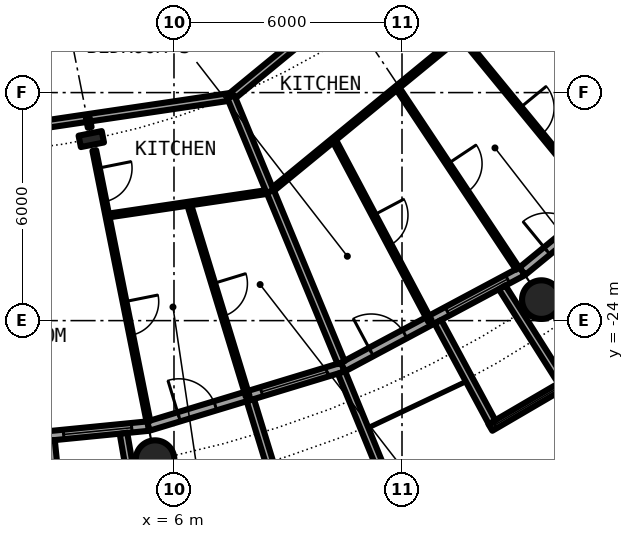
"""IFC4 building model, lengths in metres.
Left out: names, types, materials, properties, quantities, classifications, styles, units other than length and angle.
Written with IfcOpenShell. Run it as: python <this file> out.ifc"""

import sys

from ifc_helpers import new_model, si_unit, direction, frame, frame_2d, origin, origin_2d, place, context, subcontext, project, spatial, rectangle, circle, hollow_circle, i_section, extrude, element, fill, save


model = new_model("IFC4")
c1 = context("Model", 3, precision=1e-05, world=origin(), true_north=direction((0.0, 1.0)))
c2 = subcontext(c1, "Body", "Model", "MODEL_VIEW")
j1 = project(units=[si_unit("LENGTHUNIT", "METRE"), si_unit("PLANEANGLEUNIT", "RADIAN")], contexts=[c1])
p1 = place(None, origin())
s1 = spatial("IfcSite", under=j1, at=p1, CompositionType="ELEMENT")
p2 = place(p1, origin())
s2 = spatial("IfcBuilding", under=s1, at=p2, CompositionType="ELEMENT")
p3 = place(p2, frame((0.0, 0.0, 35.0)))
s3 = spatial("IfcBuildingStorey", under=s2, at=p3, CompositionType="ELEMENT", Elevation=35.0)
for number, where, z_axis, x_axis in (
    (1, (5.501, -27.658, 0.0), (0.0, 0.0, 1.0), (1.0, 0.0, 0.0)),
    (2, (15.667, -23.448, 0.0), (0.0, 0.0, 1.0), (1.0, 0.0, 0.0)),
):
    element("IfcColumn", number, at=place(p3, frame(where, z_axis=z_axis, x_axis=x_axis)), inside=s3, PredefinedType="COLUMN", context=c2, shape_type="SweptSolid", body=[
        extrude(hollow_circle(Radius=0.508, WallThickness=0.05, at=origin_2d()), origin(), (0.0, 0.0, 1.0), 3.05),
    ])
p4 = place(p3, frame((3.824, -19.223, 0.0), z_axis=(0.0, 0.0, 1.0), x_axis=(0.195090322016, -0.980785280403, 0.0)))
e3 = element("IfcColumn", 3, at=p4, inside=s3, PredefinedType="COLUMN", context=c2, shape_type="SweptSolid", body=[
    extrude(i_section(OverallWidth=0.305, OverallDepth=0.62, WebThickness=0.021, FlangeThickness=0.04, FilletRadius=0.027, at=origin_2d()), origin(), (0.0, 0.0, 1.0), 3.05),
])
p5 = place(p3, frame((0.0, -27.3, 0.0), z_axis=(0.0, 0.0, 1.0), x_axis=(0.995173996315, 0.098126026407, 0.0)))
e4 = element("IfcWall", 4, at=p5, inside=s3, PredefinedType="SOLIDWALL", context=c2, shape_type="SweptSolid", body=[
    extrude(rectangle(XDim=5.352, YDim=0.25, at=frame_2d((2.676, 0.0))), origin(), (0.0, 0.0, 1.0), 2.7),
])
p6 = place(p5, frame((0.841, 0.0, 0.0)))
e5 = element("IfcOpeningElement", 5, at=p6, cuts=e4, PredefinedType="OPENING", context=c2, shape_type="SweptSolid", body=[
    extrude(rectangle(XDim=1.0, YDim=2.2, at=frame_2d((0.5, 1.1))), frame((0.0, 0.135, 0.0), z_axis=(0.0, -1.0, 0.0), x_axis=(1.0, 0.0, 0.0)), (0.0, 0.0, 1.0), 0.27),
])
p7 = place(p5, frame((3.111, 0.0, 0.3)))
e6 = element("IfcOpeningElement", 6, at=p7, cuts=e4, PredefinedType="OPENING", context=c2, shape_type="SweptSolid", body=[
    extrude(rectangle(XDim=1.8, YDim=2.1, at=frame_2d((0.9, 1.05))), frame((0.0, 0.135, 0.0), z_axis=(0.0, -1.0, 0.0), x_axis=(1.0, 0.0, 0.0)), (0.0, 0.0, 1.0), 0.27),
])
p8 = place(p3, frame((2.764, -27.153, -0.03), z_axis=(0.0, 0.0, 1.0), x_axis=(0.101505487237, -0.994834979311, 0.0)))
e7 = element("IfcWall", 7, at=p8, inside=s3, PredefinedType="SOLIDWALL", context=c2, shape_type="SweptSolid", body=[
    extrude(rectangle(XDim=3.007, YDim=0.2, at=frame_2d((1.503, 0.0))), origin(), (0.0, 0.0, 1.0), 2.73),
])
p9 = place(p3, frame((4.671, -26.966, -0.03), z_axis=(0.0, 0.0, 1.0), x_axis=(0.170539878907, -0.985350774954, 0.0)))
e8 = element("IfcWall", 8, at=p9, inside=s3, PredefinedType="SOLIDWALL", context=c2, shape_type="SweptSolid", body=[
    extrude(rectangle(XDim=2.932, YDim=0.2, at=frame_2d((1.466, 0.0))), origin(), (0.0, 0.0, 1.0), 2.73),
])
p10 = place(p3, frame((5.326, -26.775, 0.0), z_axis=(0.0, 0.0, 1.0), x_axis=(0.956965678721, 0.290201119486, 0.0)))
e9 = element("IfcWall", 9, at=p10, inside=s3, PredefinedType="SOLIDWALL", context=c2, shape_type="SweptSolid", body=[
    extrude(rectangle(XDim=5.351, YDim=0.25, at=frame_2d((2.676, 0.0))), origin(), (0.0, 0.0, 1.0), 2.7),
])
p11 = place(p10, frame((0.841, 0.0, 0.0)))
e10 = element("IfcOpeningElement", 10, at=p11, cuts=e9, PredefinedType="OPENING", context=c2, shape_type="SweptSolid", body=[
    extrude(rectangle(XDim=1.0, YDim=2.2, at=frame_2d((0.5, 1.1))), frame((0.0, 0.135, 0.0), z_axis=(0.0, -1.0, 0.0), x_axis=(1.0, 0.0, 0.0)), (0.0, 0.0, 1.0), 0.27),
])
p12 = place(p10, frame((3.111, 0.0, 0.3)))
e11 = element("IfcOpeningElement", 11, at=p12, cuts=e9, PredefinedType="OPENING", context=c2, shape_type="SweptSolid", body=[
    extrude(rectangle(XDim=1.8, YDim=2.1, at=frame_2d((0.9, 1.05))), frame((0.0, 0.135, 0.0), z_axis=(0.0, -1.0, 0.0), x_axis=(1.0, 0.0, 0.0)), (0.0, 0.0, 1.0), 0.27),
])
p13 = place(p3, frame((8.009, -26.092, -0.03), z_axis=(0.0, 0.0, 1.0), x_axis=(0.293406695073, -0.955987715029, 0.0)))
e12 = element("IfcWall", 12, at=p13, inside=s3, PredefinedType="SOLIDWALL", context=c2, shape_type="SweptSolid", body=[
    extrude(rectangle(XDim=3.006, YDim=0.2, at=frame_2d((1.503, 0.0))), origin(), (0.0, 0.0, 1.0), 2.73),
])
p14 = place(p3, frame((10.409, -25.364, -0.03), z_axis=(0.0, 0.0, 1.0), x_axis=(0.379509886562, -0.925187681501, 0.0)))
e13 = element("IfcWall", 13, at=p14, inside=s3, PredefinedType="SOLIDWALL", context=c2, shape_type="SweptSolid", body=[
    extrude(rectangle(XDim=2.883, YDim=0.2, at=frame_2d((1.441, 0.0))), origin(), (0.0, 0.0, 1.0), 2.73),
])
p15 = place(p3, frame((10.447, -25.222, 0.0), z_axis=(0.0, 0.0, 1.0), x_axis=(0.881915646801, 0.471407246368, 0.0)))
e14 = element("IfcWall", 14, at=p15, inside=s3, PredefinedType="SOLIDWALL", context=c2, shape_type="SweptSolid", body=[
    extrude(rectangle(XDim=5.352, YDim=0.25, at=frame_2d((2.676, 0.0))), origin(), (0.0, 0.0, 1.0), 2.7),
])
p16 = place(p15, frame((0.841, 0.0, 0.0)))
e15 = element("IfcOpeningElement", 15, at=p16, cuts=e14, PredefinedType="OPENING", context=c2, shape_type="SweptSolid", body=[
    extrude(rectangle(XDim=1.0, YDim=2.2, at=frame_2d((0.5, 1.1))), frame((0.0, 0.135, 0.0), z_axis=(0.0, -1.0, 0.0), x_axis=(1.0, 0.0, 0.0)), (0.0, 0.0, 1.0), 0.27),
])
p17 = place(p15, frame((3.111, 0.0, 0.3)))
e16 = element("IfcOpeningElement", 16, at=p17, cuts=e14, PredefinedType="OPENING", context=c2, shape_type="SweptSolid", body=[
    extrude(rectangle(XDim=1.8, YDim=2.1, at=frame_2d((0.9, 1.05))), frame((0.0, 0.135, 0.0), z_axis=(0.0, -1.0, 0.0), x_axis=(1.0, 0.0, 0.0)), (0.0, 0.0, 1.0), 0.27),
])
p18 = place(p3, frame((14.327, -26.812, -0.03), z_axis=(0.0, 0.0, 1.0), x_axis=(0.863346521872, 0.504611517081, 0.0)))
e17 = element("IfcWall", 17, at=p18, inside=s3, PredefinedType="SOLIDWALL", context=c2, shape_type="SweptSolid", body=[
    extrude(rectangle(XDim=2.336, YDim=0.2, at=frame_2d((1.168, 0.0))), origin(), (0.0, 0.0, 1.0), 2.73),
])
p19 = place(p18, frame((0.128, 0.0, 0.33)))
e18 = element("IfcOpeningElement", 18, at=p19, cuts=e17, PredefinedType="OPENING", context=c2, shape_type="SweptSolid", body=[
    extrude(circle(Radius=1.04, at=frame_2d((1.04, 1.04))), frame((0.0, 0.11, 0.0), z_axis=(0.0, -1.0, 0.0), x_axis=(1.0, 0.0, 0.0)), (0.0, 0.0, 1.0), 0.22),
])
p20 = place(p3, frame((12.945, -24.029, -0.03), z_axis=(0.0, 0.0, 1.0), x_axis=(0.474424310775, -0.88029629861, 0.0)))
e19 = element("IfcWall", 19, at=p20, inside=s3, PredefinedType="SOLIDWALL", context=c2, shape_type="SweptSolid", body=[
    extrude(rectangle(XDim=3.006, YDim=0.2, at=frame_2d((1.503, 0.0))), origin(), (0.0, 0.0, 1.0), 2.73),
])
p21 = place(p3, frame((14.635, -23.126, -0.03), z_axis=(0.0, 0.0, 1.0), x_axis=(0.534437802731, -0.845207805816, 0.0)))
e20 = element("IfcWall", 20, at=p21, inside=s3, PredefinedType="SOLIDWALL", context=c2, shape_type="SweptSolid", body=[
    extrude(rectangle(XDim=2.932, YDim=0.2, at=frame_2d((1.466, 0.0))), origin(), (0.0, 0.0, 1.0), 2.73),
])
p22 = place(p3, frame((15.167, -22.699, 0.0), z_axis=(0.0, 0.0, 1.0), x_axis=(0.773019449054, 0.634382322723, 0.0)))
e21 = element("IfcWall", 21, at=p22, inside=s3, PredefinedType="SOLIDWALL", context=c2, shape_type="SweptSolid", body=[
    extrude(rectangle(XDim=5.352, YDim=0.25, at=frame_2d((2.676, 0.0))), origin(), (0.0, 0.0, 1.0), 2.7),
])
p23 = place(p22, frame((0.841, 0.0, 0.0)))
e22 = element("IfcOpeningElement", 22, at=p23, cuts=e21, PredefinedType="OPENING", context=c2, shape_type="SweptSolid", body=[
    extrude(rectangle(XDim=1.0, YDim=2.2, at=frame_2d((0.5, 1.1))), frame((0.0, 0.135, 0.0), z_axis=(0.0, -1.0, 0.0), x_axis=(1.0, 0.0, 0.0)), (0.0, 0.0, 1.0), 0.27),
])
p24 = place(p22, frame((3.111, 0.0, 0.3)))
e23 = element("IfcOpeningElement", 23, at=p24, cuts=e21, PredefinedType="OPENING", context=c2, shape_type="SweptSolid", body=[
    extrude(rectangle(XDim=1.8, YDim=2.1, at=frame_2d((0.9, 1.05))), frame((0.0, 0.135, 0.0), z_axis=(0.0, -1.0, 0.0), x_axis=(1.0, 0.0, 0.0)), (0.0, 0.0, 1.0), 0.27),
])
p25 = place(p3, frame((4.246, -21.239, 0.0), z_axis=(0.0, 0.0, 1.0), x_axis=(0.989178348771, 0.146718077695, 0.0)))
e24 = element("IfcWall", 24, at=p25, inside=s3, PredefinedType="PARTITIONING", context=c2, shape_type="SweptSolid", body=[
    extrude(rectangle(XDim=4.335, YDim=0.1, at=frame_2d((2.167, 0.0))), origin(), (0.0, 0.0, 1.0), 2.7),
])
p26 = place(p3, frame((8.534, -20.603, 0.0), z_axis=(0.0, 0.0, 1.0), x_axis=(0.773000340237, 0.634405606843, 0.0)))
e25 = element("IfcWall", 25, at=p26, inside=s3, PredefinedType="PARTITIONING", context=c2, shape_type="SweptSolid", body=[
    extrude(rectangle(XDim=6.474, YDim=0.1, at=frame_2d((3.237, 0.0))), origin(), (0.0, 0.0, 1.0), 2.7),
])
p27 = place(p3, frame((-1.927, -19.506, 0.0), z_axis=(0.0, 0.0, 1.0), x_axis=(0.989181308547, 0.146698121399, 0.0)))
e26 = element("IfcWall", 26, at=p27, inside=s3, PredefinedType="PARTITIONING", context=c2, shape_type="SweptSolid", body=[
    extrude(rectangle(XDim=9.531, YDim=0.2, at=frame_2d((4.766, 0.0))), origin(), (0.0, 0.0, 1.0), 2.38),
])
p28 = place(p27, frame((3.316, 0.0, 0.0)))
e27 = element("IfcOpeningElement", 27, at=p28, cuts=e26, PredefinedType="OPENING", context=c2, shape_type="SweptSolid", body=[
    extrude(rectangle(XDim=1.0, YDim=2.3, at=frame_2d((0.5, 1.15))), frame((0.0, 0.11, 0.0), z_axis=(0.0, -1.0, 0.0), x_axis=(1.0, 0.0, 0.0)), (0.0, 0.0, 1.0), 0.22),
])
p29 = place(p3, frame((7.512, -18.105, 0.0), z_axis=(0.0, 0.0, 1.0), x_axis=(0.772704887747, 0.634765434198, 0.0)))
e28 = element("IfcWall", 28, at=p29, inside=s3, PredefinedType="PARTITIONING", context=c2, shape_type="SweptSolid", body=[
    extrude(rectangle(XDim=11.209, YDim=0.2, at=frame_2d((5.604, 0.0))), origin(), (0.0, 0.0, 1.0), 2.38),
])
p30 = place(p29, frame((7.072, 0.0, 0.0)))
e29 = element("IfcOpeningElement", 29, at=p30, cuts=e28, PredefinedType="OPENING", context=c2, shape_type="SweptSolid", body=[
    extrude(rectangle(XDim=1.0, YDim=2.3, at=frame_2d((0.5, 1.15))), frame((0.0, 0.11, 0.0), z_axis=(0.0, -1.0, 0.0), x_axis=(1.0, 0.0, 0.0)), (0.0, 0.0, 1.0), 0.22),
])
p31 = place(p3, frame((3.732, -18.667, 0.0), z_axis=(0.0, 0.0, 1.0), x_axis=(0.197040251839, -0.980395399395, 0.0)))
e30 = element("IfcWall", 30, at=p31, inside=s3, PredefinedType="PARTITIONING", context=c2, shape_type="SweptSolid", body=[
    extrude(rectangle(XDim=0.254, YDim=0.1, at=frame_2d((0.127, 0.0))), origin(), (0.0, 0.0, 1.0), 2.7),
])
p32 = place(p3, frame((3.903, -19.524, 0.0), z_axis=(0.0, 0.0, 1.0), x_axis=(0.195986881771, -0.980606517505, 0.0)))
e31 = element("IfcWall", 31, at=p32, inside=s3, PredefinedType="PARTITIONING", context=c2, shape_type="SweptSolid", body=[
    extrude(rectangle(XDim=7.265, YDim=0.1, at=frame_2d((3.632, 0.0))), origin(), (0.0, 0.0, 1.0), 2.7),
])
p33 = place(p32, frame((0.476, 0.0, 0.0)))
e32 = element("IfcOpeningElement", 32, at=p33, cuts=e31, PredefinedType="OPENING", context=c2, shape_type="SweptSolid", body=[
    extrude(rectangle(XDim=0.9, YDim=2.3, at=frame_2d((0.45, 1.15))), frame((0.0, 0.06, 0.0), z_axis=(0.0, -1.0, 0.0), x_axis=(1.0, 0.0, 0.0)), (0.0, 0.0, 1.0), 0.12),
])
p34 = place(p32, frame((4.057, 0.0, 0.0)))
e33 = element("IfcOpeningElement", 33, at=p34, cuts=e31, PredefinedType="OPENING", context=c2, shape_type="SweptSolid", body=[
    extrude(rectangle(XDim=0.9, YDim=2.3, at=frame_2d((0.45, 1.15))), frame((0.0, 0.06, 0.0), z_axis=(0.0, -1.0, 0.0), x_axis=(1.0, 0.0, 0.0)), (0.0, 0.0, 1.0), 0.12),
])
p35 = place(p3, frame((6.39, -20.921, 0.0), z_axis=(0.0, 0.0, 1.0), x_axis=(0.292081613207, -0.956393397732, 0.0)))
e34 = element("IfcWall", 34, at=p35, inside=s3, PredefinedType="PARTITIONING", context=c2, shape_type="SweptSolid", body=[
    extrude(rectangle(XDim=5.3, YDim=0.1, at=frame_2d((2.65, 0.0))), origin(), (0.0, 0.0, 1.0), 2.7),
])
p36 = place(p35, frame((2.2, 0.0, 0.0)))
e35 = element("IfcOpeningElement", 35, at=p36, cuts=e34, PredefinedType="OPENING", context=c2, shape_type="SweptSolid", body=[
    extrude(rectangle(XDim=0.9, YDim=2.3, at=frame_2d((0.45, 1.15))), frame((0.0, 0.06, 0.0), z_axis=(0.0, -1.0, 0.0), x_axis=(1.0, 0.0, 0.0)), (0.0, 0.0, 1.0), 0.12),
])
p37 = place(p3, frame((7.496, -18.11, 0.0), z_axis=(0.0, 0.0, 1.0), x_axis=(0.382540781694, -0.923938607452, 0.0)))
e36 = element("IfcWall", 36, at=p37, inside=s3, PredefinedType="PARTITIONING", context=c2, shape_type="SweptSolid", body=[
    extrude(rectangle(XDim=2.7, YDim=0.2, at=frame_2d((1.35, 0.0))), origin(), (0.0, 0.0, 1.0), 2.7),
])
p38 = place(p3, frame((8.534, -20.603, 0.0), z_axis=(0.0, 0.0, 1.0), x_axis=(0.382651153718, -0.923892902104, 0.0)))
e37 = element("IfcWall", 37, at=p38, inside=s3, PredefinedType="PARTITIONING", context=c2, shape_type="SweptSolid", body=[
    extrude(rectangle(XDim=4.874, YDim=0.2, at=frame_2d((2.437, 0.0))), origin(), (0.0, 0.0, 1.0), 2.7),
])
p39 = place(p3, frame((10.202, -19.234, 0.0), z_axis=(0.0, 0.0, 1.0), x_axis=(0.468610030042, -0.883405139075, 0.0)))
e38 = element("IfcWall", 38, at=p39, inside=s3, PredefinedType="PARTITIONING", context=c2, shape_type="SweptSolid", body=[
    extrude(rectangle(XDim=5.403, YDim=0.1, at=frame_2d((2.702, 0.0))), origin(), (0.0, 0.0, 1.0), 2.7),
])
p40 = place(p39, frame((2.252, 0.0, 0.0)))
e39 = element("IfcOpeningElement", 39, at=p40, cuts=e38, PredefinedType="OPENING", context=c2, shape_type="SweptSolid", body=[
    extrude(rectangle(XDim=0.9, YDim=2.3, at=frame_2d((0.45, 1.15))), frame((0.0, 0.06, 0.0), z_axis=(0.0, -1.0, 0.0), x_axis=(1.0, 0.0, 0.0)), (0.0, 0.0, 1.0), 0.12),
])
p41 = place(p3, frame((11.871, -17.864, 0.0), z_axis=(0.0, 0.0, 1.0), x_axis=(0.553637025191, -0.83275809473, 0.0)))
e40 = element("IfcWall", 40, at=p41, inside=s3, PredefinedType="PARTITIONING", context=c2, shape_type="SweptSolid", body=[
    extrude(rectangle(XDim=5.726, YDim=0.1, at=frame_2d((2.863, 0.0))), origin(), (0.0, 0.0, 1.0), 2.7),
])
p42 = place(p41, frame((2.413, 0.0, 0.0)))
e41 = element("IfcOpeningElement", 41, at=p42, cuts=e40, PredefinedType="OPENING", context=c2, shape_type="SweptSolid", body=[
    extrude(rectangle(XDim=0.9, YDim=2.3, at=frame_2d((0.45, 1.15))), frame((0.0, 0.06, 0.0), z_axis=(0.0, -1.0, 0.0), x_axis=(1.0, 0.0, 0.0)), (0.0, 0.0, 1.0), 0.12),
])
p43 = place(p3, frame((11.899, -14.499, 0.0), z_axis=(0.0, 0.0, 1.0), x_axis=(0.634396151441, -0.77300810024, 0.0)))
e42 = element("IfcWall", 42, at=p43, inside=s3, PredefinedType="PARTITIONING", context=c2, shape_type="SweptSolid", body=[
    extrude(rectangle(XDim=8.419, YDim=0.1, at=frame_2d((4.209, 0.0))), origin(), (0.0, 0.0, 1.0), 2.7),
])
p44 = place(p43, frame((0.84, 0.0, 0.0)))
e43 = element("IfcOpeningElement", 43, at=p44, cuts=e42, PredefinedType="OPENING", context=c2, shape_type="SweptSolid", body=[
    extrude(rectangle(XDim=0.9, YDim=2.3, at=frame_2d((0.45, 1.15))), frame((0.0, 0.06, 0.0), z_axis=(0.0, -1.0, 0.0), x_axis=(1.0, 0.0, 0.0)), (0.0, 0.0, 1.0), 0.12),
])
p45 = place(p43, frame((5.051, 0.0, 0.0)))
e44 = element("IfcOpeningElement", 44, at=p45, cuts=e42, PredefinedType="OPENING", context=c2, shape_type="SweptSolid", body=[
    extrude(rectangle(XDim=0.9, YDim=2.3, at=frame_2d((0.45, 1.15))), frame((0.0, 0.06, 0.0), z_axis=(0.0, -1.0, 0.0), x_axis=(1.0, 0.0, 0.0)), (0.0, 0.0, 1.0), 0.12),
])
p46 = place(p7, origin())
e45 = element("IfcWindow", 45, at=p46, inside=s3, PartitioningType="SINGLE_PANEL", PredefinedType="WINDOW", context=c2, shape_type="SweptSolid", body=[
    extrude(rectangle(XDim=1.8, YDim=2.1, at=frame_2d((0.9, 1.05))), frame((0.0, 0.03, 0.0), z_axis=(0.0, -1.0, 0.0), x_axis=(1.0, 0.0, 0.0)), (0.0, 0.0, 1.0), 0.06),
])
fill(e6, e45)
p47 = place(p11, origin())
e46 = element("IfcDoor", 46, at=p47, inside=s3, OperationType="SINGLE_SWING_LEFT", PredefinedType="DOOR", context=c2, shape_type="SweptSolid", body=[
    extrude(rectangle(XDim=1.0, YDim=2.2, at=frame_2d((0.5, 1.1))), frame((0.0, 0.025, 0.0), z_axis=(0.0, -1.0, 0.0), x_axis=(1.0, 0.0, 0.0)), (0.0, 0.0, 1.0), 0.05),
])
fill(e10, e46)
p48 = place(p12, origin())
e47 = element("IfcWindow", 47, at=p48, inside=s3, PartitioningType="SINGLE_PANEL", PredefinedType="WINDOW", context=c2, shape_type="SweptSolid", body=[
    extrude(rectangle(XDim=1.8, YDim=2.1, at=frame_2d((0.9, 1.05))), frame((0.0, 0.03, 0.0), z_axis=(0.0, -1.0, 0.0), x_axis=(1.0, 0.0, 0.0)), (0.0, 0.0, 1.0), 0.06),
])
fill(e11, e47)
p49 = place(p16, origin())
e48 = element("IfcDoor", 48, at=p49, inside=s3, OperationType="SINGLE_SWING_LEFT", PredefinedType="DOOR", context=c2, shape_type="SweptSolid", body=[
    extrude(rectangle(XDim=1.0, YDim=2.2, at=frame_2d((0.5, 1.1))), frame((0.0, 0.025, 0.0), z_axis=(0.0, -1.0, 0.0), x_axis=(1.0, 0.0, 0.0)), (0.0, 0.0, 1.0), 0.05),
])
fill(e15, e48)
p50 = place(p17, origin())
e49 = element("IfcWindow", 49, at=p50, inside=s3, PartitioningType="SINGLE_PANEL", PredefinedType="WINDOW", context=c2, shape_type="SweptSolid", body=[
    extrude(rectangle(XDim=1.8, YDim=2.1, at=frame_2d((0.9, 1.05))), frame((0.0, 0.03, 0.0), z_axis=(0.0, -1.0, 0.0), x_axis=(1.0, 0.0, 0.0)), (0.0, 0.0, 1.0), 0.06),
])
fill(e16, e49)
p51 = place(p19, origin())
e50 = element("IfcWindow", 50, at=p51, inside=s3, PartitioningType="SINGLE_PANEL", PredefinedType="WINDOW", context=c2, shape_type="SweptSolid", body=[
    extrude(circle(Radius=1.04, at=frame_2d((1.04, 1.04))), frame((0.0, 0.03, 0.0), z_axis=(0.0, -1.0, 0.0), x_axis=(1.0, 0.0, 0.0)), (0.0, 0.0, 1.0), 0.06),
])
fill(e18, e50)
p52 = place(p23, origin())
e51 = element("IfcDoor", 51, at=p52, inside=s3, OperationType="SINGLE_SWING_LEFT", PredefinedType="DOOR", context=c2, shape_type="SweptSolid", body=[
    extrude(rectangle(XDim=1.0, YDim=2.2, at=frame_2d((0.5, 1.1))), frame((0.0, 0.025, 0.0), z_axis=(0.0, -1.0, 0.0), x_axis=(1.0, 0.0, 0.0)), (0.0, 0.0, 1.0), 0.05),
])
fill(e22, e51)
p53 = place(p33, origin())
e52 = element("IfcDoor", 52, at=p53, inside=s3, OperationType="SINGLE_SWING_LEFT", PredefinedType="DOOR", context=c2, shape_type="SweptSolid", body=[
    extrude(rectangle(XDim=0.9, YDim=2.3, at=frame_2d((0.45, 1.15))), frame((0.0, 0.025, 0.0), z_axis=(0.0, -1.0, 0.0), x_axis=(1.0, 0.0, 0.0)), (0.0, 0.0, 1.0), 0.05),
])
fill(e32, e52)
p54 = place(p34, origin())
e53 = element("IfcDoor", 53, at=p54, inside=s3, OperationType="SINGLE_SWING_RIGHT", PredefinedType="DOOR", context=c2, shape_type="SweptSolid", body=[
    extrude(rectangle(XDim=0.9, YDim=2.3, at=frame_2d((0.45, 1.15))), frame((0.0, 0.025, 0.0), z_axis=(0.0, -1.0, 0.0), x_axis=(1.0, 0.0, 0.0)), (0.0, 0.0, 1.0), 0.05),
])
fill(e33, e53)
p55 = place(p36, origin())
e54 = element("IfcDoor", 54, at=p55, inside=s3, OperationType="SINGLE_SWING_LEFT", PredefinedType="DOOR", context=c2, shape_type="SweptSolid", body=[
    extrude(rectangle(XDim=0.9, YDim=2.3, at=frame_2d((0.45, 1.15))), frame((0.0, 0.025, 0.0), z_axis=(0.0, -1.0, 0.0), x_axis=(1.0, 0.0, 0.0)), (0.0, 0.0, 1.0), 0.05),
])
fill(e35, e54)
p56 = place(p45, origin())
e55 = element("IfcDoor", 55, at=p56, inside=s3, OperationType="SINGLE_SWING_RIGHT", PredefinedType="DOOR", context=c2, shape_type="SweptSolid", body=[
    extrude(rectangle(XDim=0.9, YDim=2.3, at=frame_2d((0.45, 1.15))), frame((0.0, 0.025, 0.0), z_axis=(0.0, -1.0, 0.0), x_axis=(1.0, 0.0, 0.0)), (0.0, 0.0, 1.0), 0.05),
])
fill(e44, e55)
p57 = place(p42, origin())
e56 = element("IfcDoor", 56, at=p57, inside=s3, OperationType="SINGLE_SWING_RIGHT", PredefinedType="DOOR", context=c2, shape_type="SweptSolid", body=[
    extrude(rectangle(XDim=0.9, YDim=2.3, at=frame_2d((0.45, 1.15))), frame((0.0, 0.025, 0.0), z_axis=(0.0, -1.0, 0.0), x_axis=(1.0, 0.0, 0.0)), (0.0, 0.0, 1.0), 0.05),
])
fill(e41, e56)
p58 = place(p40, origin())
e57 = element("IfcDoor", 57, at=p58, inside=s3, OperationType="SINGLE_SWING_RIGHT", PredefinedType="DOOR", context=c2, shape_type="SweptSolid", body=[
    extrude(rectangle(XDim=0.9, YDim=2.3, at=frame_2d((0.45, 1.15))), frame((0.0, 0.025, 0.0), z_axis=(0.0, -1.0, 0.0), x_axis=(1.0, 0.0, 0.0)), (0.0, 0.0, 1.0), 0.05),
])
fill(e39, e57)
save(model, sys.argv[1])
